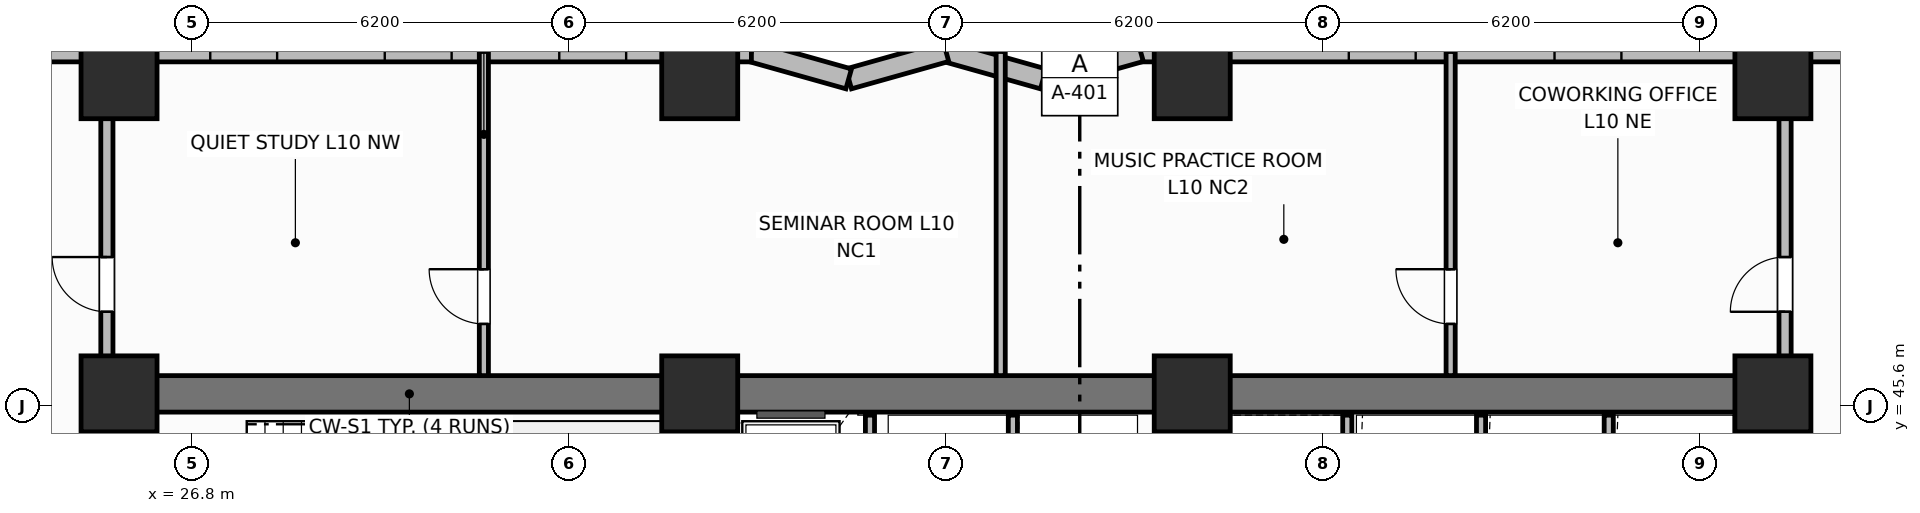
"""IFC4 building model, lengths in metres.
Left out: names, types, materials, properties, quantities, classifications, styles, units other than length and angle.
Written with IfcOpenShell. Run it as: python <this file> out.ifc"""

import sys

from ifc_helpers import new_model, si_unit, direction, frame, frame_2d, origin, origin_2d, place, context, subcontext, project, spatial, rectangle, extrude, element, fill, save


model = new_model("IFC4")
c1 = context("Model", 3, precision=1e-05, world=origin(), true_north=direction((0.0, 1.0)))
c2 = subcontext(c1, "Body", "Model", "MODEL_VIEW")
j1 = project(units=[si_unit("LENGTHUNIT", "METRE"), si_unit("PLANEANGLEUNIT", "RADIAN")], contexts=[c1])
p1 = place(None, origin())
s1 = spatial("IfcSite", under=j1, at=p1, CompositionType="ELEMENT")
p2 = place(p1, origin())
s2 = spatial("IfcBuilding", under=s1, at=p2, CompositionType="ELEMENT")
p3 = place(p2, frame((0.0, 0.0, 43.6)))
s3 = spatial("IfcBuildingStorey", under=s2, at=p3, CompositionType="ELEMENT", Elevation=43.6)
p4 = place(p3, frame((25.6, 45.8, 0.0), z_axis=(0.0, 0.0, 1.0), x_axis=(1.0, 0.0, 0.0)))
e1 = element("IfcWall", 1, at=p4, inside=s3, PredefinedType="SHEAR", context=c2, shape_type="SweptSolid", body=[
    extrude(rectangle(XDim=27.2, YDim=0.6, at=frame_2d((13.6, 0.0))), origin(), (0.0, 0.0, 1.0), 3.7),
])
for number, where, z_axis, x_axis in (
    (2, (25.6, 39.9, 0.0), (0.0, 0.0, 1.0), (0.0, 1.0, 0.0)),
    (3, (52.8, 39.9, 0.0), (0.0, 0.0, 1.0), (0.0, 1.0, 0.0)),
):
    element("IfcWall", number, at=place(p3, frame(where, z_axis=z_axis, x_axis=x_axis)), inside=s3, PredefinedType="SHEAR", context=c2, shape_type="SweptSolid", body=[
        extrude(rectangle(XDim=5.6, YDim=0.6, at=frame_2d((2.8, 0.0))), origin(), (0.0, 0.0, 1.0), 3.7),
    ])
for number, where, z_axis, x_axis in (
    (4, (35.15, 39.9, 0.0), (0.0, 0.0, 1.0), (0.0, 1.0, 0.0)),
    (5, (43.25, 39.9, 0.0), (0.0, 0.0, 1.0), (0.0, 1.0, 0.0)),
):
    element("IfcWall", number, at=place(p3, frame(where, z_axis=z_axis, x_axis=x_axis)), inside=s3, PredefinedType="SHEAR", context=c2, shape_type="SweptSolid", body=[
        extrude(rectangle(XDim=5.6, YDim=0.4, at=frame_2d((2.8, 0.0))), origin(), (0.0, 0.0, 1.0), 3.7),
    ])
for number, where, z_axis, x_axis in (
    (6, (25.6, 45.8, 0.0), (0.0, 0.0, 1.0), (1.0, 0.0, 0.0)),
    (7, (35.15, 45.8, 0.0), (0.0, 0.0, 1.0), (1.0, 0.0, 0.0)),
    (8, (43.25, 45.8, 0.0), (0.0, 0.0, 1.0), (1.0, 0.0, 0.0)),
    (9, (52.8, 45.8, 0.0), (0.0, 0.0, 1.0), (1.0, 0.0, 0.0)),
    (10, (25.6, 50.95, 0.0), (0.0, 0.0, 1.0), (1.0, 0.0, 0.0)),
    (11, (35.15, 50.95, 0.0), (0.0, 0.0, 1.0), (1.0, 0.0, 0.0)),
    (12, (43.25, 50.95, 0.0), (0.0, 0.0, 1.0), (1.0, 0.0, 0.0)),
    (13, (52.8, 50.95, 0.0), (0.0, 0.0, 1.0), (1.0, 0.0, 0.0)),
):
    element("IfcColumn", number, at=place(p3, frame(where, z_axis=z_axis, x_axis=x_axis)), inside=s3, PredefinedType="COLUMN", context=c2, shape_type="SweptSolid", body=[
        extrude(rectangle(XDim=1.25, YDim=1.25, at=origin_2d()), origin(), (0.0, 0.0, 1.0), 3.7),
    ])
p5 = place(p3, frame((59.8, 51.43, 0.0), z_axis=(0.0, 0.0, 1.0), x_axis=(-1.0, 0.0, 0.0)))
e14 = element("IfcWall", 14, at=p5, inside=s3, PredefinedType="SOLIDWALL", context=c2, shape_type="SweptSolid", body=[
    extrude(rectangle(XDim=17.4, YDim=0.34, at=frame_2d((8.7, 0.0))), origin(), (0.0, 0.0, 1.0), 2.7),
])
p6 = place(p5, frame((1.442, 0.0, 0.93)))
e15 = element("IfcOpeningElement", 15, at=p6, cuts=e14, PredefinedType="OPENING", context=c2, shape_type="SweptSolid", body=[
    extrude(rectangle(XDim=1.1, YDim=1.65, at=frame_2d((0.55, 0.825))), frame((0.0, 0.18, 0.0), z_axis=(0.0, -1.0, 0.0), x_axis=(1.0, 0.0, 0.0)), (0.0, 0.0, 1.0), 0.36),
])
p7 = place(p5, frame((3.425, 0.0, 0.93)))
e16 = element("IfcOpeningElement", 16, at=p7, cuts=e14, PredefinedType="OPENING", context=c2, shape_type="SweptSolid", body=[
    extrude(rectangle(XDim=1.1, YDim=1.65, at=frame_2d((0.55, 0.825))), frame((0.0, 0.18, 0.0), z_axis=(0.0, -1.0, 0.0), x_axis=(1.0, 0.0, 0.0)), (0.0, 0.0, 1.0), 0.36),
])
p8 = place(p5, frame((9.492, 0.0, 0.93)))
e17 = element("IfcOpeningElement", 17, at=p8, cuts=e14, PredefinedType="OPENING", context=c2, shape_type="SweptSolid", body=[
    extrude(rectangle(XDim=1.1, YDim=1.65, at=frame_2d((0.55, 0.825))), frame((0.0, 0.18, 0.0), z_axis=(0.0, -1.0, 0.0), x_axis=(1.0, 0.0, 0.0)), (0.0, 0.0, 1.0), 0.36),
])
p9 = place(p5, frame((12.875, 0.0, 0.93)))
e18 = element("IfcOpeningElement", 18, at=p9, cuts=e14, PredefinedType="OPENING", context=c2, shape_type="SweptSolid", body=[
    extrude(rectangle(XDim=1.1, YDim=1.65, at=frame_2d((0.55, 0.825))), frame((0.0, 0.18, 0.0), z_axis=(0.0, -1.0, 0.0), x_axis=(1.0, 0.0, 0.0)), (0.0, 0.0, 1.0), 0.36),
])
p10 = place(p3, frame((42.4, 51.43, 0.0), z_axis=(0.0, 0.0, 1.0), x_axis=(-0.962652136636, -0.270741322725, 0.0)))
e19 = element("IfcWall", 19, at=p10, inside=s3, PredefinedType="SOLIDWALL", context=c2, shape_type="SweptSolid", body=[
    extrude(rectangle(XDim=1.662, YDim=0.34, at=frame_2d((0.831, 0.0))), origin(), (0.0, 0.0, 1.0), 2.7),
])
p11 = place(p3, frame((40.8, 50.98, 0.0), z_axis=(0.0, 0.0, 1.0), x_axis=(-0.962662902433, 0.270703040766, 0.0)))
e20 = element("IfcWall", 20, at=p11, inside=s3, PredefinedType="SOLIDWALL", context=c2, shape_type="SweptSolid", body=[
    extrude(rectangle(XDim=1.662, YDim=0.34, at=frame_2d((0.831, 0.0))), origin(), (0.0, 0.0, 1.0), 2.7),
])
p12 = place(p3, frame((39.2, 51.43, 0.0), z_axis=(0.0, 0.0, 1.0), x_axis=(-0.962652136636, -0.270741322725, 0.0)))
e21 = element("IfcWall", 21, at=p12, inside=s3, PredefinedType="SOLIDWALL", context=c2, shape_type="SweptSolid", body=[
    extrude(rectangle(XDim=1.662, YDim=0.34, at=frame_2d((0.831, 0.0))), origin(), (0.0, 0.0, 1.0), 2.7),
])
p13 = place(p3, frame((37.6, 50.98, 0.0), z_axis=(0.0, 0.0, 1.0), x_axis=(-0.962662902433, 0.270703040766, 0.0)))
e22 = element("IfcWall", 22, at=p13, inside=s3, PredefinedType="SOLIDWALL", context=c2, shape_type="SweptSolid", body=[
    extrude(rectangle(XDim=1.662, YDim=0.34, at=frame_2d((0.831, 0.0))), origin(), (0.0, 0.0, 1.0), 2.7),
])
p14 = place(p3, frame((36.0, 51.43, 0.0), z_axis=(0.0, 0.0, 1.0), x_axis=(-1.0, 0.0, 0.0)))
e23 = element("IfcWall", 23, at=p14, inside=s3, PredefinedType="SOLIDWALL", context=c2, shape_type="SweptSolid", body=[
    extrude(rectangle(XDim=17.4, YDim=0.34, at=frame_2d((8.7, 0.0))), origin(), (0.0, 0.0, 1.0), 2.7),
])
p15 = place(p14, frame((2.06, 0.0, 0.93)))
e24 = element("IfcOpeningElement", 24, at=p15, cuts=e23, PredefinedType="OPENING", context=c2, shape_type="SweptSolid", body=[
    extrude(rectangle(XDim=1.1, YDim=1.65, at=frame_2d((0.55, 0.825))), frame((0.0, 0.18, 0.0), z_axis=(0.0, -1.0, 0.0), x_axis=(1.0, 0.0, 0.0)), (0.0, 0.0, 1.0), 0.36),
])
p16 = place(p14, frame((4.93, 0.0, 0.93)))
e25 = element("IfcOpeningElement", 25, at=p16, cuts=e23, PredefinedType="OPENING", context=c2, shape_type="SweptSolid", body=[
    extrude(rectangle(XDim=1.1, YDim=1.65, at=frame_2d((0.55, 0.825))), frame((0.0, 0.18, 0.0), z_axis=(0.0, -1.0, 0.0), x_axis=(1.0, 0.0, 0.0)), (0.0, 0.0, 1.0), 0.36),
])
p17 = place(p14, frame((7.8, 0.0, 0.93)))
e26 = element("IfcOpeningElement", 26, at=p17, cuts=e23, PredefinedType="OPENING", context=c2, shape_type="SweptSolid", body=[
    extrude(rectangle(XDim=1.1, YDim=1.65, at=frame_2d((0.55, 0.825))), frame((0.0, 0.18, 0.0), z_axis=(0.0, -1.0, 0.0), x_axis=(1.0, 0.0, 0.0)), (0.0, 0.0, 1.0), 0.36),
])
p18 = place(p14, frame((14.59, 0.0, 0.93)))
e27 = element("IfcOpeningElement", 27, at=p18, cuts=e23, PredefinedType="OPENING", context=c2, shape_type="SweptSolid", body=[
    extrude(rectangle(XDim=1.1, YDim=1.65, at=frame_2d((0.55, 0.825))), frame((0.0, 0.18, 0.0), z_axis=(0.0, -1.0, 0.0), x_axis=(1.0, 0.0, 0.0)), (0.0, 0.0, 1.0), 0.36),
])
p19 = place(p3, frame((37.95, 42.6, 0.0), z_axis=(0.0, 0.0, 1.0), x_axis=(0.0, 1.0, 0.0)))
e28 = element("IfcWall", 28, at=p19, inside=s3, PredefinedType="PARTITIONING", context=c2, shape_type="SweptSolid", body=[
    extrude(rectangle(XDim=2.85, YDim=0.15, at=frame_2d((1.425, 0.0))), origin(), (0.0, 0.0, 1.0), 2.53),
])
for number, where, z_axis, x_axis in (
    (29, (40.3, 42.65, 0.0), (0.0, 0.0, 1.0), (0.0, 1.0, 0.0)),
    (30, (45.8, 42.65, 0.0), (0.0, 0.0, 1.0), (0.0, 1.0, 0.0)),
    (31, (48.0, 42.65, 0.0), (0.0, 0.0, 1.0), (0.0, 1.0, 0.0)),
    (32, (50.1, 42.65, 0.0), (0.0, 0.0, 1.0), (0.0, 1.0, 0.0)),
):
    element("IfcWall", number, at=place(p3, frame(where, z_axis=z_axis, x_axis=x_axis)), inside=s3, PredefinedType="PARTITIONING", context=c2, shape_type="SweptSolid", body=[
        extrude(rectangle(XDim=2.8, YDim=0.15, at=frame_2d((1.4, 0.0))), origin(), (0.0, 0.0, 1.0), 2.53),
    ])
p20 = place(p3, frame((31.6, 46.1, 0.0), z_axis=(0.0, 0.0, 1.0), x_axis=(0.0, 1.0, 0.0)))
e33 = element("IfcWall", 33, at=p20, inside=s3, PredefinedType="PARTITIONING", context=c2, shape_type="SweptSolid", body=[
    extrude(rectangle(XDim=5.33, YDim=0.15, at=frame_2d((2.665, 0.0))), origin(), (0.0, 0.0, 1.0), 2.53),
])
p21 = place(p20, frame((0.85, 0.0, 0.0)))
e34 = element("IfcOpeningElement", 34, at=p21, cuts=e33, PredefinedType="OPENING", context=c2, shape_type="SweptSolid", body=[
    extrude(rectangle(XDim=0.9, YDim=2.1, at=frame_2d((0.45, 1.05))), frame((0.0, 0.085, 0.0), z_axis=(0.0, -1.0, 0.0), x_axis=(1.0, 0.0, 0.0)), (0.0, 0.0, 1.0), 0.17),
])
p22 = place(p3, frame((40.1, 46.1, 0.0), z_axis=(0.0, 0.0, 1.0), x_axis=(0.0, 1.0, 0.0)))
e35 = element("IfcWall", 35, at=p22, inside=s3, PredefinedType="PARTITIONING", context=c2, shape_type="SweptSolid", body=[
    extrude(rectangle(XDim=5.33, YDim=0.15, at=frame_2d((2.665, 0.0))), origin(), (0.0, 0.0, 1.0), 2.53),
])
p23 = place(p3, frame((47.5, 46.1, 0.0), z_axis=(0.0, 0.0, 1.0), x_axis=(0.0, 1.0, 0.0)))
e36 = element("IfcWall", 36, at=p23, inside=s3, PredefinedType="PARTITIONING", context=c2, shape_type="SweptSolid", body=[
    extrude(rectangle(XDim=5.33, YDim=0.15, at=frame_2d((2.665, 0.0))), origin(), (0.0, 0.0, 1.0), 2.53),
])
p24 = place(p23, frame((0.85, 0.0, 0.0)))
e37 = element("IfcOpeningElement", 37, at=p24, cuts=e36, PredefinedType="OPENING", context=c2, shape_type="SweptSolid", body=[
    extrude(rectangle(XDim=0.9, YDim=2.1, at=frame_2d((0.45, 1.05))), frame((0.0, 0.085, 0.0), z_axis=(0.0, -1.0, 0.0), x_axis=(1.0, 0.0, 0.0)), (0.0, 0.0, 1.0), 0.17),
])
p25 = place(p3, frame((25.4, 46.1, 0.0), z_axis=(0.0, 0.0, 1.0), x_axis=(0.0, 1.0, 0.0)))
e38 = element("IfcWall", 38, at=p25, inside=s3, PredefinedType="PARTITIONING", context=c2, shape_type="SweptSolid", body=[
    extrude(rectangle(XDim=4.38, YDim=0.2, at=frame_2d((2.19, 0.0))), origin(), (0.0, 0.0, 1.0), 2.53),
])
p26 = place(p25, frame((1.05, 0.0, 0.0)))
e39 = element("IfcOpeningElement", 39, at=p26, cuts=e38, PredefinedType="OPENING", context=c2, shape_type="SweptSolid", body=[
    extrude(rectangle(XDim=0.9, YDim=2.1, at=frame_2d((0.45, 1.05))), frame((0.0, 0.11, 0.0), z_axis=(0.0, -1.0, 0.0), x_axis=(1.0, 0.0, 0.0)), (0.0, 0.0, 1.0), 0.22),
])
p27 = place(p3, frame((53.0, 46.1, 0.0), z_axis=(0.0, 0.0, 1.0), x_axis=(0.0, 1.0, 0.0)))
e40 = element("IfcWall", 40, at=p27, inside=s3, PredefinedType="PARTITIONING", context=c2, shape_type="SweptSolid", body=[
    extrude(rectangle(XDim=4.38, YDim=0.2, at=frame_2d((2.19, 0.0))), origin(), (0.0, 0.0, 1.0), 2.53),
])
p28 = place(p27, frame((1.05, 0.0, 0.0)))
e41 = element("IfcOpeningElement", 41, at=p28, cuts=e40, PredefinedType="OPENING", context=c2, shape_type="SweptSolid", body=[
    extrude(rectangle(XDim=0.9, YDim=2.1, at=frame_2d((0.45, 1.05))), frame((0.0, 0.11, 0.0), z_axis=(0.0, -1.0, 0.0), x_axis=(1.0, 0.0, 0.0)), (0.0, 0.0, 1.0), 0.22),
])
p29 = place(p8, origin())
e42 = element("IfcWindow", 42, at=p29, inside=s3, PartitioningType="SINGLE_PANEL", PredefinedType="WINDOW", context=c2, shape_type="SweptSolid", body=[
    extrude(rectangle(XDim=1.1, YDim=1.65, at=frame_2d((0.55, 0.825))), frame((0.0, 0.03, 0.0), z_axis=(0.0, -1.0, 0.0), x_axis=(1.0, 0.0, 0.0)), (0.0, 0.0, 1.0), 0.06),
])
fill(e17, e42)
p30 = place(p9, origin())
e43 = element("IfcWindow", 43, at=p30, inside=s3, PartitioningType="SINGLE_PANEL", PredefinedType="WINDOW", context=c2, shape_type="SweptSolid", body=[
    extrude(rectangle(XDim=1.1, YDim=1.65, at=frame_2d((0.55, 0.825))), frame((0.0, 0.03, 0.0), z_axis=(0.0, -1.0, 0.0), x_axis=(1.0, 0.0, 0.0)), (0.0, 0.0, 1.0), 0.06),
])
fill(e18, e43)
p31 = place(p15, origin())
e44 = element("IfcWindow", 44, at=p31, inside=s3, PartitioningType="SINGLE_PANEL", PredefinedType="WINDOW", context=c2, shape_type="SweptSolid", body=[
    extrude(rectangle(XDim=1.1, YDim=1.65, at=frame_2d((0.55, 0.825))), frame((0.0, 0.03, 0.0), z_axis=(0.0, -1.0, 0.0), x_axis=(1.0, 0.0, 0.0)), (0.0, 0.0, 1.0), 0.06),
])
fill(e24, e44)
p32 = place(p16, origin())
e45 = element("IfcWindow", 45, at=p32, inside=s3, PartitioningType="SINGLE_PANEL", PredefinedType="WINDOW", context=c2, shape_type="SweptSolid", body=[
    extrude(rectangle(XDim=1.1, YDim=1.65, at=frame_2d((0.55, 0.825))), frame((0.0, 0.03, 0.0), z_axis=(0.0, -1.0, 0.0), x_axis=(1.0, 0.0, 0.0)), (0.0, 0.0, 1.0), 0.06),
])
fill(e25, e45)
p33 = place(p17, origin())
e46 = element("IfcWindow", 46, at=p33, inside=s3, PartitioningType="SINGLE_PANEL", PredefinedType="WINDOW", context=c2, shape_type="SweptSolid", body=[
    extrude(rectangle(XDim=1.1, YDim=1.65, at=frame_2d((0.55, 0.825))), frame((0.0, 0.03, 0.0), z_axis=(0.0, -1.0, 0.0), x_axis=(1.0, 0.0, 0.0)), (0.0, 0.0, 1.0), 0.06),
])
fill(e26, e46)
p34 = place(p21, origin())
e47 = element("IfcDoor", 47, at=p34, inside=s3, OperationType="SINGLE_SWING_RIGHT", PredefinedType="DOOR", context=c2, shape_type="SweptSolid", body=[
    extrude(rectangle(XDim=0.9, YDim=2.1, at=frame_2d((0.45, 1.05))), frame((0.0, 0.025, 0.0), z_axis=(0.0, -1.0, 0.0), x_axis=(1.0, 0.0, 0.0)), (0.0, 0.0, 1.0), 0.05),
])
fill(e34, e47)
p35 = place(p24, origin())
e48 = element("IfcDoor", 48, at=p35, inside=s3, OperationType="SINGLE_SWING_RIGHT", PredefinedType="DOOR", context=c2, shape_type="SweptSolid", body=[
    extrude(rectangle(XDim=0.9, YDim=2.1, at=frame_2d((0.45, 1.05))), frame((0.0, 0.025, 0.0), z_axis=(0.0, -1.0, 0.0), x_axis=(1.0, 0.0, 0.0)), (0.0, 0.0, 1.0), 0.05),
])
fill(e37, e48)
p36 = place(p26, origin())
e49 = element("IfcDoor", 49, at=p36, inside=s3, OperationType="SINGLE_SWING_RIGHT", PredefinedType="DOOR", context=c2, shape_type="SweptSolid", body=[
    extrude(rectangle(XDim=0.9, YDim=2.1, at=frame_2d((0.45, 1.05))), frame((0.0, 0.025, 0.0), z_axis=(0.0, -1.0, 0.0), x_axis=(1.0, 0.0, 0.0)), (0.0, 0.0, 1.0), 0.05),
])
fill(e39, e49)
p37 = place(p28, origin())
e50 = element("IfcDoor", 50, at=p37, inside=s3, OperationType="SINGLE_SWING_LEFT", PredefinedType="DOOR", context=c2, shape_type="SweptSolid", body=[
    extrude(rectangle(XDim=0.9, YDim=2.1, at=frame_2d((0.45, 1.05))), frame((0.0, 0.025, 0.0), z_axis=(0.0, -1.0, 0.0), x_axis=(1.0, 0.0, 0.0)), (0.0, 0.0, 1.0), 0.05),
])
fill(e41, e50)
save(model, sys.argv[1])
